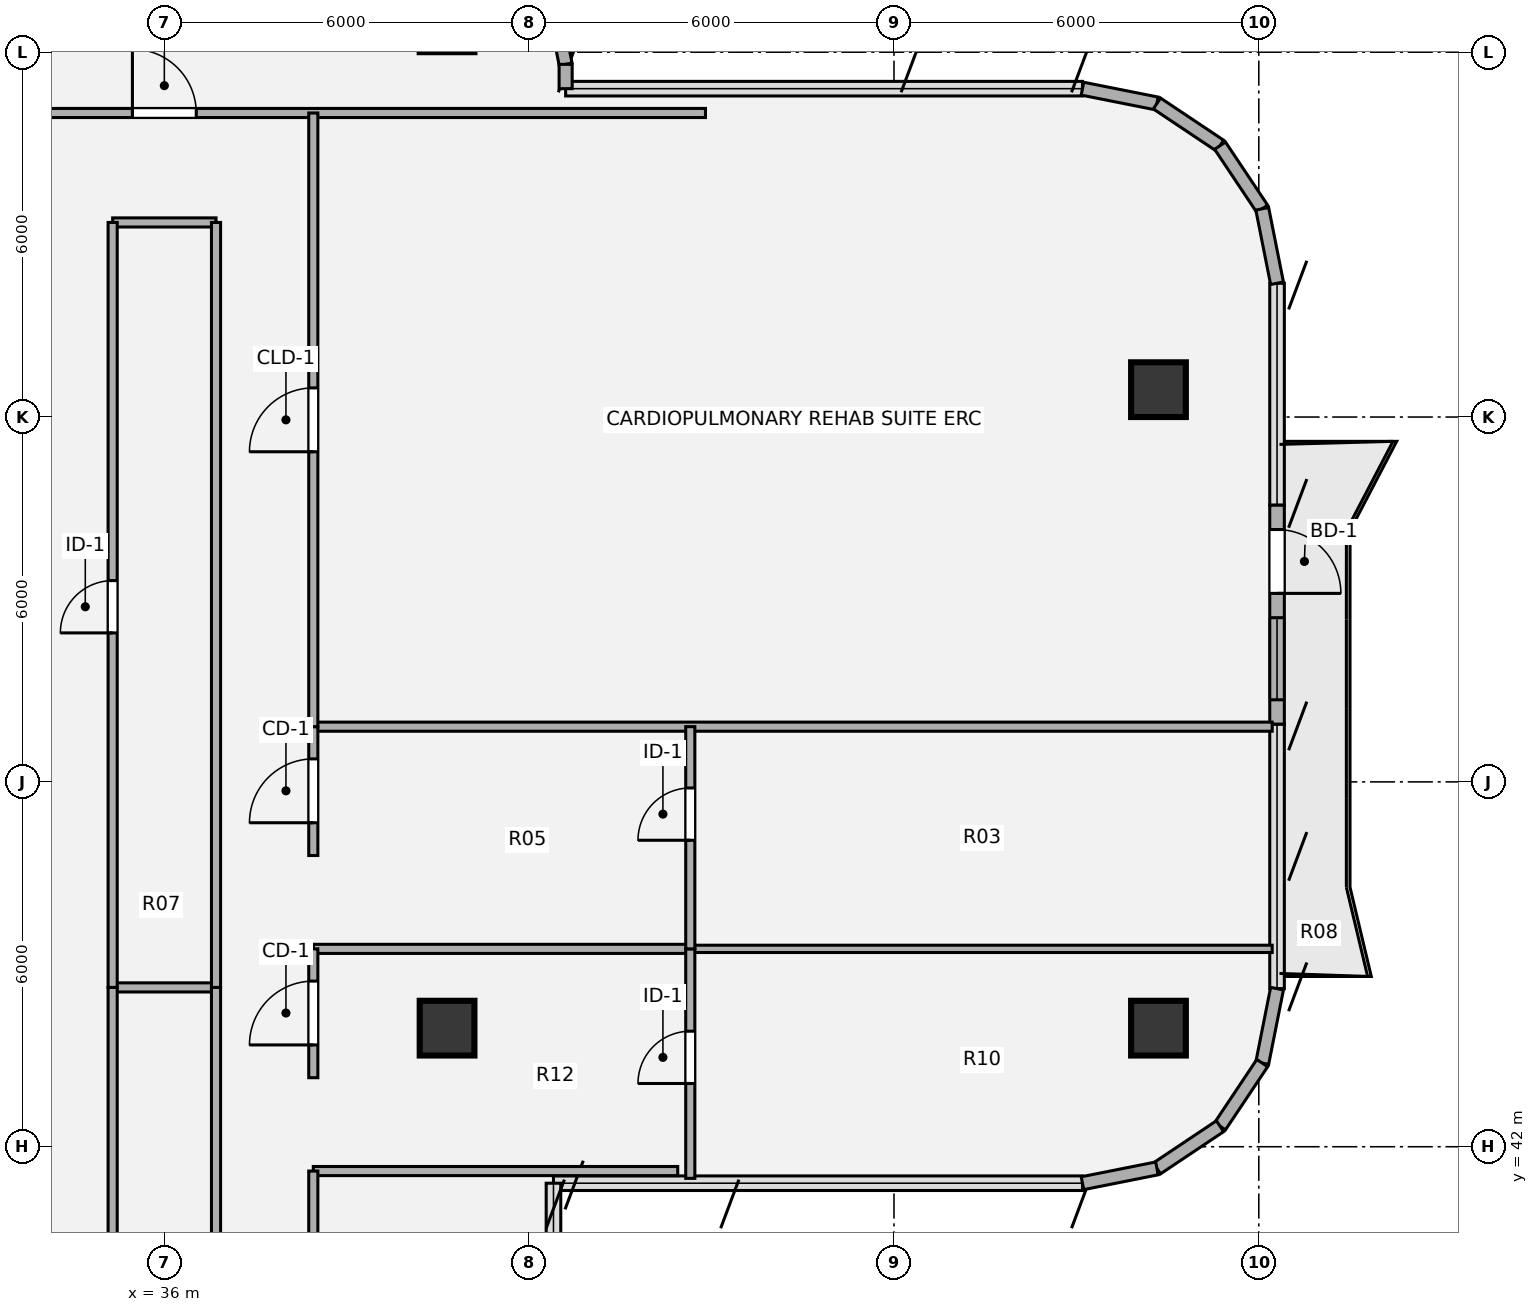
"""IFC4 building model, lengths in metres.
Left out: names, types, materials, properties, quantities, classifications, styles, units other than length and angle.
Written with IfcOpenShell. Run it as: python <this file> out.ifc"""

import sys

from ifc_helpers import new_model, si_unit, direction, frame, frame_2d, origin, origin_2d, place, context, subcontext, project, spatial, rectangle, hollow_circle, extrude, source, transform, mapped, element, fill, save


model = new_model("IFC4")
c1 = context("Model", 3, precision=1e-05, world=origin(), true_north=direction((0.0, 1.0)))
c2 = subcontext(c1, "Body", "Model", "MODEL_VIEW")
j1 = project(units=[si_unit("LENGTHUNIT", "METRE"), si_unit("PLANEANGLEUNIT", "RADIAN")], contexts=[c1])
p1 = place(None, origin())
s1 = spatial("IfcSite", under=j1, at=p1, CompositionType="ELEMENT")
p2 = place(p1, origin())
s2 = spatial("IfcBuilding", under=s1, at=p2, CompositionType="ELEMENT")
p3 = place(p2, frame((0.0, 0.0, 249.48)))
s3 = spatial("IfcBuildingStorey", under=s2, at=p3, CompositionType="ELEMENT", Elevation=249.48)
m1 = source(origin(), c2, "Body", "SweptSolid", [
    extrude(hollow_circle(Radius=0.45, WallThickness=0.032, at=origin_2d()), origin(), (0.0, 0.0, 1.0), 3.78),
])
for number, where, z_axis, x_axis in (
    (1, (52.35, 43.95, 0.0), (0.0, 0.0, 1.0), (1.0, 0.0, 0.0)),
    (2, (52.35, 54.45, 0.0), (0.0, 0.0, 1.0), (1.0, 0.0, 0.0)),
    (3, (40.65, 43.95, 0.0), (0.0, 0.0, 1.0), (1.0, 0.0, 0.0)),
):
    element("IfcColumn", number, at=place(p3, frame(where, z_axis=z_axis, x_axis=x_axis)), inside=s3, PredefinedType="COLUMN", context=c2, shape_type="MappedRepresentation", body=[
        mapped(m1, transform((0.0, 0.0, 0.0), x_axis=(1.0, 0.0, 0.0), y_axis=(0.0, 1.0, 0.0), z_axis=(0.0, 0.0, 1.0), scale=1.0)),
    ])
p4 = place(p3, frame((42.402, 60.795, 0.0), z_axis=(0.0, 0.0, 1.0), x_axis=(0.195190360752, -0.980765376158, 0.0)))
e4 = element("IfcWall", 4, at=p4, inside=s3, PredefinedType="SOLIDWALL", context=c2, shape_type="SweptSolid", body=[
    extrude(rectangle(XDim=1.014, YDim=0.215, at=frame_2d((0.507, 0.0))), origin(), (0.0, 0.0, 1.0), 3.53),
])
p5 = place(p3, frame((42.6, 59.8, 0.0), z_axis=(0.0, 0.0, 1.0), x_axis=(0.0, -1.0, 0.0)))
e5 = element("IfcWall", 5, at=p5, inside=s3, PredefinedType="SOLIDWALL", context=c2, shape_type="SweptSolid", body=[
    extrude(rectangle(XDim=0.4, YDim=0.215, at=frame_2d((0.2, 0.0))), origin(), (0.0, 0.0, 1.0), 3.53),
])
for number, where, z_axis, x_axis in (
    (6, (51.1, 59.4, 0.0), (0.0, 0.0, 1.0), (0.981, -0.195, 0.0)),
    (7, (52.325, 59.156, 0.0), (0.0, 0.0, 1.0), (0.831, -0.556, 0.0)),
    (8, (53.363, 58.463, 0.0), (0.0, 0.0, 1.0), (0.556, -0.831, 0.0)),
    (9, (54.056, 57.425, 0.0), (0.0, 0.0, 1.0), (0.195, -0.981, 0.0)),
):
    element("IfcWall", number, at=place(p3, frame(where, z_axis=z_axis, x_axis=x_axis)), inside=s3, PredefinedType="SOLIDWALL", context=c2, shape_type="SweptSolid", body=[
        extrude(rectangle(XDim=1.249, YDim=0.215, at=frame_2d((0.624, 0.0))), origin(), (0.0, 0.0, 1.0), 3.53),
    ])
p6 = place(p3, frame((54.3, 52.55, 0.0), z_axis=(0.0, 0.0, 1.0), x_axis=(0.0, -1.0, 0.0)))
e10 = element("IfcWall", 10, at=p6, inside=s3, PredefinedType="SOLIDWALL", context=c2, shape_type="SweptSolid", body=[
    extrude(rectangle(XDim=3.6, YDim=0.24, at=frame_2d((1.8, 0.0))), origin(), (0.0, 0.0, 1.0), 3.53),
])
p7 = place(p6, frame((0.4, 0.0, 0.0)))
e11 = element("IfcOpeningElement", 11, at=p7, cuts=e10, PredefinedType="OPENING", context=c2, shape_type="SweptSolid", body=[
    extrude(rectangle(XDim=1.05, YDim=2.15, at=origin_2d()), frame((0.525, 0.13, 1.075), z_axis=(0.0, -1.0, 0.0), x_axis=(1.0, 0.0, 0.0)), (0.0, 0.0, 1.0), 0.26),
])
p8 = place(p6, frame((1.85, 0.0, 0.85)))
e12 = element("IfcOpeningElement", 12, at=p8, cuts=e10, PredefinedType="OPENING", context=c2, shape_type="SweptSolid", body=[
    extrude(rectangle(XDim=1.35, YDim=1.35, at=origin_2d()), frame((0.675, 0.13, 0.675), z_axis=(0.0, -1.0, 0.0), x_axis=(1.0, 0.0, 0.0)), (0.0, 0.0, 1.0), 0.26),
])
for number, where, z_axis, x_axis in (
    (13, (54.3, 44.6, 0.0), (0.0, 0.0, 1.0), (-0.195, -0.981, 0.0)),
    (14, (54.056, 43.375, 0.0), (0.0, 0.0, 1.0), (-0.556, -0.831, 0.0)),
    (15, (53.363, 42.337, 0.0), (0.0, 0.0, 1.0), (-0.831, -0.556, 0.0)),
    (16, (52.325, 41.644, 0.0), (0.0, 0.0, 1.0), (-0.981, -0.195, 0.0)),
):
    element("IfcWall", number, at=place(p3, frame(where, z_axis=z_axis, x_axis=x_axis)), inside=s3, PredefinedType="SOLIDWALL", context=c2, shape_type="SweptSolid", body=[
        extrude(rectangle(XDim=1.249, YDim=0.215, at=frame_2d((0.624, 0.0))), origin(), (0.0, 0.0, 1.0), 3.53),
    ])
p9 = place(p3, frame((38.45, 41.6, 0.0), z_axis=(0.0, 0.0, 1.0), x_axis=(1.0, 0.0, 0.0)))
e17 = element("IfcWall", 17, at=p9, inside=s3, PredefinedType="PARTITIONING", context=c2, shape_type="SweptSolid", body=[
    extrude(rectangle(XDim=5.993, YDim=0.15, at=frame_2d((2.997, 0.0))), origin(), (0.0, 0.0, 1.0), 3.5),
])
p10 = place(p3, frame((35.15, 44.62, 0.0), z_axis=(0.0, 0.0, 1.0), x_axis=(1.0, 0.0, 0.0)))
e18 = element("IfcWall", 18, at=p10, inside=s3, PredefinedType="PARTITIONING", context=c2, shape_type="SweptSolid", body=[
    extrude(rectangle(XDim=1.7, YDim=0.15, at=frame_2d((0.85, 0.0))), origin(), (0.0, 0.0, 1.0), 3.259),
])
p11 = place(p3, frame((38.45, 45.254, 0.0), z_axis=(0.0, 0.0, 1.0), x_axis=(1.0, 0.0, 0.0)))
e19 = element("IfcWall", 19, at=p11, inside=s3, PredefinedType="PARTITIONING", context=c2, shape_type="SweptSolid", body=[
    extrude(rectangle(XDim=6.2, YDim=0.15, at=frame_2d((3.1, 0.0))), origin(), (0.0, 0.0, 1.0), 2.982),
])
p12 = place(p3, frame((44.65, 45.254, 0.0), z_axis=(0.0, 0.0, 1.0), x_axis=(1.0, 0.0, 0.0)))
e20 = element("IfcWall", 20, at=p12, inside=s3, PredefinedType="PARTITIONING", context=c2, shape_type="SweptSolid", body=[
    extrude(rectangle(XDim=9.57, YDim=0.12, at=frame_2d((4.785, 0.0))), origin(), (0.0, 0.0, 1.0), 2.982),
])
p13 = place(p3, frame((38.45, 48.908, 0.0), z_axis=(0.0, 0.0, 1.0), x_axis=(1.0, 0.0, 0.0)))
e21 = element("IfcWall", 21, at=p13, inside=s3, PredefinedType="PARTITIONING", context=c2, shape_type="SweptSolid", body=[
    extrude(rectangle(XDim=15.77, YDim=0.15, at=frame_2d((7.885, 0.0))), origin(), (0.0, 0.0, 1.0), 2.982),
])
p14 = place(p3, frame((35.15, 57.2, 0.0), z_axis=(0.0, 0.0, 1.0), x_axis=(1.0, 0.0, 0.0)))
e22 = element("IfcWall", 22, at=p14, inside=s3, PredefinedType="PARTITIONING", context=c2, shape_type="SweptSolid", body=[
    extrude(rectangle(XDim=1.7, YDim=0.15, at=frame_2d((0.85, 0.0))), origin(), (0.0, 0.0, 1.0), 3.308),
])
p15 = place(p3, frame((27.1, 59.0, 0.0), z_axis=(0.0, 0.0, 1.0), x_axis=(1.0, 0.0, 0.0)))
e23 = element("IfcWall", 23, at=p15, inside=s3, PredefinedType="PARTITIONING", context=c2, shape_type="SweptSolid", body=[
    extrude(rectangle(XDim=17.8, YDim=0.15, at=frame_2d((8.9, 0.0))), origin(), (0.0, 0.0, 1.0), 3.308),
])
p16 = place(p15, frame((8.375, 0.0, 0.0)))
e24 = element("IfcOpeningElement", 24, at=p16, cuts=e23, PredefinedType="OPENING", context=c2, shape_type="SweptSolid", body=[
    extrude(rectangle(XDim=1.05, YDim=2.1, at=origin_2d()), frame((0.525, 0.085, 1.05), z_axis=(0.0, -1.0, 0.0), x_axis=(1.0, 0.0, 0.0)), (0.0, 0.0, 1.0), 0.17),
])
p17 = place(p3, frame((35.15, 25.2, 0.0), z_axis=(0.0, 0.0, 1.0), x_axis=(0.0, 1.0, 0.0)))
e25 = element("IfcWall", 25, at=p17, inside=s3, PredefinedType="PARTITIONING", context=c2, shape_type="SweptSolid", body=[
    extrude(rectangle(XDim=19.42, YDim=0.15, at=frame_2d((9.71, 0.0))), origin(), (0.0, 0.0, 1.0), 3.5),
])
p18 = place(p3, frame((35.15, 44.62, 0.0), z_axis=(0.0, 0.0, 1.0), x_axis=(0.0, 1.0, 0.0)))
e26 = element("IfcWall", 26, at=p18, inside=s3, PredefinedType="PARTITIONING", context=c2, shape_type="SweptSolid", body=[
    extrude(rectangle(XDim=12.58, YDim=0.15, at=frame_2d((6.29, 0.0))), origin(), (0.0, 0.0, 1.0), 3.5),
])
p19 = place(p18, frame((5.83, 0.0, 0.0)))
e27 = element("IfcOpeningElement", 27, at=p19, cuts=e26, PredefinedType="OPENING", context=c2, shape_type="SweptSolid", body=[
    extrude(rectangle(XDim=0.86, YDim=2.1, at=origin_2d()), frame((0.43, 0.085, 1.05), z_axis=(0.0, -1.0, 0.0), x_axis=(1.0, 0.0, 0.0)), (0.0, 0.0, 1.0), 0.17),
])
p20 = place(p3, frame((36.85, 25.2, 0.0), z_axis=(0.0, 0.0, 1.0), x_axis=(0.0, 1.0, 0.0)))
e28 = element("IfcWall", 28, at=p20, inside=s3, PredefinedType="PARTITIONING", context=c2, shape_type="SweptSolid", body=[
    extrude(rectangle(XDim=19.42, YDim=0.15, at=frame_2d((9.71, 0.0))), origin(), (0.0, 0.0, 1.0), 3.5),
])
p21 = place(p20, frame((9.185, 0.0, 0.0)))
e29 = element("IfcOpeningElement", 29, at=p21, cuts=e28, PredefinedType="OPENING", context=c2, shape_type="SweptSolid", body=[
    extrude(rectangle(XDim=1.05, YDim=2.1, at=origin_2d()), frame((0.525, 0.085, 1.05), z_axis=(0.0, -1.0, 0.0), x_axis=(1.0, 0.0, 0.0)), (0.0, 0.0, 1.0), 0.17),
])
p22 = place(p3, frame((36.85, 44.62, 0.0), z_axis=(0.0, 0.0, 1.0), x_axis=(0.0, 1.0, 0.0)))
e30 = element("IfcWall", 30, at=p22, inside=s3, PredefinedType="PARTITIONING", context=c2, shape_type="SweptSolid", body=[
    extrude(rectangle(XDim=12.58, YDim=0.15, at=frame_2d((6.29, 0.0))), origin(), (0.0, 0.0, 1.0), 3.5),
])
p23 = place(p3, frame((38.45, 22.4, 0.0), z_axis=(0.0, 0.0, 1.0), x_axis=(0.0, 1.0, 0.0)))
e31 = element("IfcWall", 31, at=p23, inside=s3, PredefinedType="PARTITIONING", context=c2, shape_type="SweptSolid", body=[
    extrude(rectangle(XDim=19.2, YDim=0.15, at=frame_2d((9.6, 0.0))), origin(), (0.0, 0.0, 1.0), 3.5),
])
p24 = place(p23, frame((8.975, 0.0, 0.0)))
e32 = element("IfcOpeningElement", 32, at=p24, cuts=e31, PredefinedType="OPENING", context=c2, shape_type="SweptSolid", body=[
    extrude(rectangle(XDim=1.05, YDim=2.1, at=origin_2d()), frame((0.525, 0.085, 1.05), z_axis=(0.0, -1.0, 0.0), x_axis=(1.0, 0.0, 0.0)), (0.0, 0.0, 1.0), 0.17),
])
p25 = place(p3, frame((38.45, 43.135, 0.0), z_axis=(0.0, 0.0, 1.0), x_axis=(0.0, 1.0, 0.0)))
e33 = element("IfcWall", 33, at=p25, inside=s3, PredefinedType="PARTITIONING", context=c2, shape_type="SweptSolid", body=[
    extrude(rectangle(XDim=2.119, YDim=0.15, at=frame_2d((1.06, 0.0))), origin(), (0.0, 0.0, 1.0), 3.5),
])
p26 = place(p25, frame((0.539, 0.0, 0.0)))
e34 = element("IfcOpeningElement", 34, at=p26, cuts=e33, PredefinedType="OPENING", context=c2, shape_type="SweptSolid", body=[
    extrude(rectangle(XDim=1.05, YDim=2.1, at=origin_2d()), frame((0.525, 0.085, 1.05), z_axis=(0.0, -1.0, 0.0), x_axis=(1.0, 0.0, 0.0)), (0.0, 0.0, 1.0), 0.17),
])
p27 = place(p3, frame((38.45, 46.789, 0.0), z_axis=(0.0, 0.0, 1.0), x_axis=(0.0, 1.0, 0.0)))
e35 = element("IfcWall", 35, at=p27, inside=s3, PredefinedType="PARTITIONING", context=c2, shape_type="SweptSolid", body=[
    extrude(rectangle(XDim=2.119, YDim=0.15, at=frame_2d((1.06, 0.0))), origin(), (0.0, 0.0, 1.0), 3.5),
])
p28 = place(p27, frame((0.539, 0.0, 0.0)))
e36 = element("IfcOpeningElement", 36, at=p28, cuts=e35, PredefinedType="OPENING", context=c2, shape_type="SweptSolid", body=[
    extrude(rectangle(XDim=1.05, YDim=2.1, at=origin_2d()), frame((0.525, 0.085, 1.05), z_axis=(0.0, -1.0, 0.0), x_axis=(1.0, 0.0, 0.0)), (0.0, 0.0, 1.0), 0.17),
])
p29 = place(p3, frame((38.45, 48.908, 0.0), z_axis=(0.0, 0.0, 1.0), x_axis=(0.0, 1.0, 0.0)))
e37 = element("IfcWall", 37, at=p29, inside=s3, PredefinedType="PARTITIONING", context=c2, shape_type="SweptSolid", body=[
    extrude(rectangle(XDim=10.092, YDim=0.15, at=frame_2d((5.046, 0.0))), origin(), (0.0, 0.0, 1.0), 3.5),
])
p30 = place(p29, frame((4.521, 0.0, 0.0)))
e38 = element("IfcOpeningElement", 38, at=p30, cuts=e37, PredefinedType="OPENING", context=c2, shape_type="SweptSolid", body=[
    extrude(rectangle(XDim=1.05, YDim=2.1, at=origin_2d()), frame((0.525, 0.085, 1.05), z_axis=(0.0, -1.0, 0.0), x_axis=(1.0, 0.0, 0.0)), (0.0, 0.0, 1.0), 0.17),
])
p31 = place(p3, frame((44.65, 41.48, 0.0), z_axis=(0.0, 0.0, 1.0), x_axis=(0.0, 1.0, 0.0)))
e39 = element("IfcWall", 39, at=p31, inside=s3, PredefinedType="PARTITIONING", context=c2, shape_type="SweptSolid", body=[
    extrude(rectangle(XDim=3.774, YDim=0.15, at=frame_2d((1.887, 0.0))), origin(), (0.0, 0.0, 1.0), 3.5),
])
p32 = place(p31, frame((1.56, 0.0, 0.0)))
e40 = element("IfcOpeningElement", 40, at=p32, cuts=e39, PredefinedType="OPENING", context=c2, shape_type="SweptSolid", body=[
    extrude(rectangle(XDim=0.86, YDim=2.1, at=origin_2d()), frame((0.43, 0.085, 1.05), z_axis=(0.0, -1.0, 0.0), x_axis=(1.0, 0.0, 0.0)), (0.0, 0.0, 1.0), 0.17),
])
p33 = place(p3, frame((44.65, 45.254, 0.0), z_axis=(0.0, 0.0, 1.0), x_axis=(0.0, 1.0, 0.0)))
e41 = element("IfcWall", 41, at=p33, inside=s3, PredefinedType="PARTITIONING", context=c2, shape_type="SweptSolid", body=[
    extrude(rectangle(XDim=3.654, YDim=0.15, at=frame_2d((1.827, 0.0))), origin(), (0.0, 0.0, 1.0), 3.5),
])
p34 = place(p33, frame((1.786, 0.0, 0.0)))
e42 = element("IfcOpeningElement", 42, at=p34, cuts=e41, PredefinedType="OPENING", context=c2, shape_type="SweptSolid", body=[
    extrude(rectangle(XDim=0.86, YDim=2.1, at=origin_2d()), frame((0.43, 0.085, 1.05), z_axis=(0.0, -1.0, 0.0), x_axis=(1.0, 0.0, 0.0)), (0.0, 0.0, 1.0), 0.17),
])
m2 = source(origin(), c2, "Body", "SweptSolid", [
    extrude(rectangle(XDim=1.05, YDim=2.15, at=origin_2d()), frame((0.525, 0.025, 1.075), z_axis=(0.0, -1.0, 0.0), x_axis=(1.0, 0.0, 0.0)), (0.0, 0.0, 1.0), 0.05),
])
p35 = place(p7, origin())
e43 = element("IfcDoor", 43, at=p35, inside=s3, OperationType="SINGLE_SWING_RIGHT", PredefinedType="DOOR", context=c2, shape_type="MappedRepresentation", body=[
    mapped(m2, transform((0.0, 0.0, 0.0), x_axis=(1.0, 0.0, 0.0), y_axis=(0.0, 1.0, 0.0), z_axis=(0.0, 0.0, 1.0), scale=1.0)),
])
fill(e11, e43)
m3 = source(origin(), c2, "Body", "SweptSolid", [
    extrude(rectangle(XDim=1.35, YDim=1.35, at=origin_2d()), frame((0.675, 0.03, 0.675), z_axis=(0.0, -1.0, 0.0), x_axis=(1.0, 0.0, 0.0)), (0.0, 0.0, 1.0), 0.06),
])
p36 = place(p8, origin())
e44 = element("IfcWindow", 44, at=p36, inside=s3, PartitioningType="SINGLE_PANEL", PredefinedType="WINDOW", context=c2, shape_type="MappedRepresentation", body=[
    mapped(m3, transform((0.0, 0.0, 0.0), x_axis=(1.0, 0.0, 0.0), y_axis=(0.0, 1.0, 0.0), z_axis=(0.0, 0.0, 1.0), scale=1.0)),
])
fill(e12, e44)
m4 = source(origin(), c2, "Body", "SweptSolid", [
    extrude(rectangle(XDim=1.05, YDim=2.1, at=origin_2d()), frame((0.525, 0.025, 1.05), z_axis=(0.0, -1.0, 0.0), x_axis=(1.0, 0.0, 0.0)), (0.0, 0.0, 1.0), 0.05),
])
p37 = place(p16, origin())
e45 = element("IfcDoor", 45, at=p37, inside=s3, OperationType="SINGLE_SWING_LEFT", PredefinedType="DOOR", context=c2, shape_type="MappedRepresentation", body=[
    mapped(m4, transform((0.0, 0.0, 0.0), x_axis=(1.0, 0.0, 0.0), y_axis=(0.0, 1.0, 0.0), z_axis=(0.0, 0.0, 1.0), scale=1.0)),
])
fill(e24, e45)
m5 = source(origin(), c2, "Body", "SweptSolid", [
    extrude(rectangle(XDim=0.86, YDim=2.1, at=origin_2d()), frame((0.43, 0.025, 1.05), z_axis=(0.0, -1.0, 0.0), x_axis=(1.0, 0.0, 0.0)), (0.0, 0.0, 1.0), 0.05),
])
p38 = place(p19, origin())
e46 = element("IfcDoor", 46, at=p38, inside=s3, OperationType="SINGLE_SWING_LEFT", PredefinedType="DOOR", context=c2, shape_type="MappedRepresentation", body=[
    mapped(m5, transform((0.0, 0.0, 0.0), x_axis=(1.0, 0.0, 0.0), y_axis=(0.0, 1.0, 0.0), z_axis=(0.0, 0.0, 1.0), scale=1.0)),
])
fill(e27, e46)
m6 = source(origin(), c2, "Body", "SweptSolid", [
    extrude(rectangle(XDim=1.05, YDim=2.1, at=origin_2d()), frame((0.525, 0.025, 1.05), z_axis=(0.0, -1.0, 0.0), x_axis=(1.0, 0.0, 0.0)), (0.0, 0.0, 1.0), 0.05),
])
p39 = place(p26, origin())
e47 = element("IfcDoor", 47, at=p39, inside=s3, OperationType="SINGLE_SWING_LEFT", PredefinedType="DOOR", context=c2, shape_type="MappedRepresentation", body=[
    mapped(m6, transform((0.0, 0.0, 0.0), x_axis=(1.0, 0.0, 0.0), y_axis=(0.0, 1.0, 0.0), z_axis=(0.0, 0.0, 1.0), scale=1.0)),
])
fill(e34, e47)
p40 = place(p28, origin())
e48 = element("IfcDoor", 48, at=p40, inside=s3, OperationType="SINGLE_SWING_LEFT", PredefinedType="DOOR", context=c2, shape_type="MappedRepresentation", body=[
    mapped(m6, transform((0.0, 0.0, 0.0), x_axis=(1.0, 0.0, 0.0), y_axis=(0.0, 1.0, 0.0), z_axis=(0.0, 0.0, 1.0), scale=1.0)),
])
fill(e36, e48)
p41 = place(p30, origin())
e49 = element("IfcDoor", 49, at=p41, inside=s3, OperationType="SINGLE_SWING_LEFT", PredefinedType="DOOR", context=c2, shape_type="MappedRepresentation", body=[
    mapped(m4, transform((0.0, 0.0, 0.0), x_axis=(1.0, 0.0, 0.0), y_axis=(0.0, 1.0, 0.0), z_axis=(0.0, 0.0, 1.0), scale=1.0)),
])
fill(e38, e49)
p42 = place(p32, origin())
e50 = element("IfcDoor", 50, at=p42, inside=s3, OperationType="SINGLE_SWING_LEFT", PredefinedType="DOOR", context=c2, shape_type="MappedRepresentation", body=[
    mapped(m5, transform((0.0, 0.0, 0.0), x_axis=(1.0, 0.0, 0.0), y_axis=(0.0, 1.0, 0.0), z_axis=(0.0, 0.0, 1.0), scale=1.0)),
])
fill(e40, e50)
p43 = place(p34, origin())
e51 = element("IfcDoor", 51, at=p43, inside=s3, OperationType="SINGLE_SWING_LEFT", PredefinedType="DOOR", context=c2, shape_type="MappedRepresentation", body=[
    mapped(m5, transform((0.0, 0.0, 0.0), x_axis=(1.0, 0.0, 0.0), y_axis=(0.0, 1.0, 0.0), z_axis=(0.0, 0.0, 1.0), scale=1.0)),
])
fill(e42, e51)
save(model, sys.argv[1])
